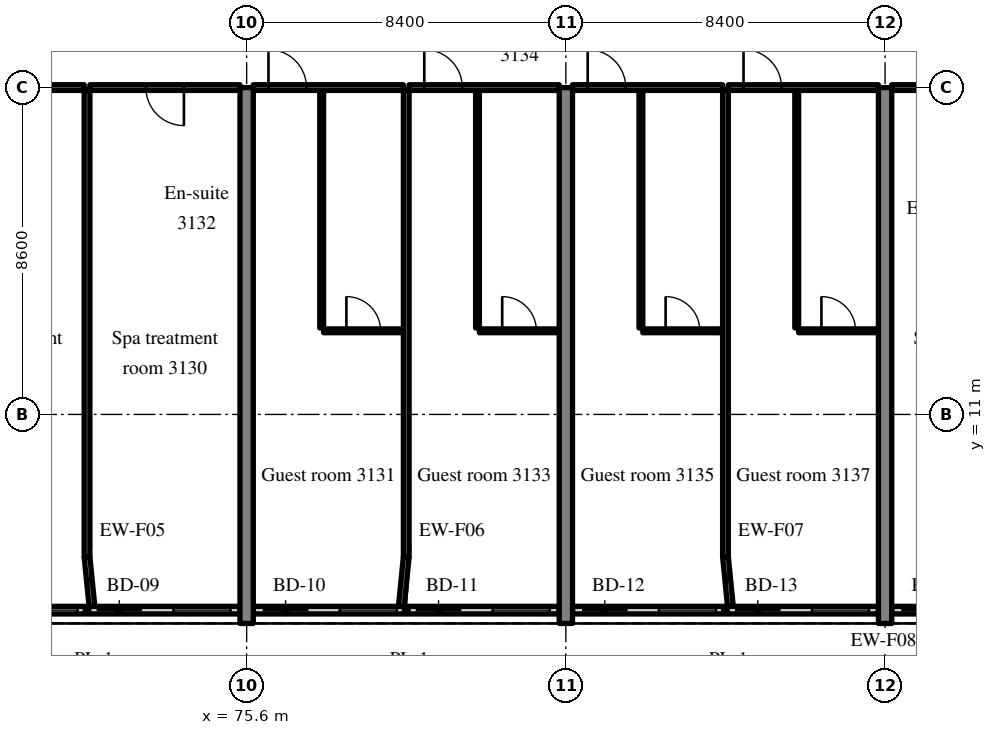
"""IFC4 building model, lengths in metres.
Left out: names, types, materials, properties, quantities, classifications, styles, units other than length and angle.
Written with IfcOpenShell. Run it as: python <this file> out.ifc"""

import sys

from ifc_helpers import new_model, si_unit, direction, frame, frame_2d, origin, place, context, subcontext, project, spatial, rectangle, extrude, source, transform, mapped, element, fill, save


model = new_model("IFC4")
c1 = context("Model", 3, precision=1e-05, world=origin(), true_north=direction((0.0, 1.0)))
c2 = subcontext(c1, "Body", "Model", "MODEL_VIEW")
j1 = project(units=[si_unit("LENGTHUNIT", "METRE"), si_unit("PLANEANGLEUNIT", "RADIAN")], contexts=[c1])
p1 = place(None, origin())
s1 = spatial("IfcSite", under=j1, at=p1, CompositionType="ELEMENT")
p2 = place(p1, origin())
s2 = spatial("IfcBuilding", under=s1, at=p2, CompositionType="ELEMENT")
p3 = place(p2, frame((0.0, 0.0, 129.4)))
s3 = spatial("IfcBuildingStorey", under=s2, at=p3, CompositionType="ELEMENT", Elevation=129.4)
m1 = source(origin(), c2, "Body", "SweptSolid", [
    extrude(rectangle(XDim=14.1, YDim=0.35, at=frame_2d((7.05, 0.0))), origin(), (0.0, 0.0, 1.0), 3.52),
])
for number, where, z_axis, x_axis in (
    (1, (75.6, 5.5, 0.0), (0.0, 0.0, 1.0), (0.0, 1.0, 0.0)),
    (2, (84.0, 5.5, 0.0), (0.0, 0.0, 1.0), (0.0, 1.0, 0.0)),
    (3, (92.4, 5.5, 0.0), (0.0, 0.0, 1.0), (0.0, 1.0, 0.0)),
):
    element("IfcWall", number, at=place(p3, frame(where, z_axis=z_axis, x_axis=x_axis)), inside=s3, PredefinedType="SHEAR", context=c2, shape_type="MappedRepresentation", body=[
        mapped(m1, transform((0.0, 0.0, 0.0), scale=1.0)),
    ])
m2 = source(origin(), c2, "Body", "SweptSolid", [
    extrude(rectangle(XDim=8.05, YDim=0.2, at=frame_2d((4.025, 0.0))), origin(), (0.0, 0.0, 1.0), 2.82),
])
p4 = place(p3, frame((67.375, 5.85, 0.0), z_axis=(0.0, 0.0, 1.0), x_axis=(1.0, 0.0, 0.0)))
e4 = element("IfcWall", 4, at=p4, inside=s3, PredefinedType="SOLIDWALL", context=c2, shape_type="MappedRepresentation", body=[
    mapped(m2, transform((0.0, 0.0, 0.0), scale=1.0)),
])
m3 = source(origin(), c2, "Body", "SweptSolid", [
    extrude(rectangle(XDim=1.2, YDim=2.4, at=frame_2d((0.6, 1.2))), frame((0.0, 0.11, 0.0), z_axis=(0.0, -1.0, 0.0), x_axis=(1.0, 0.0, 0.0)), (0.0, 0.0, 1.0), 0.22),
])
p5 = place(p4, frame((0.25, 0.0, 0.0)))
e5 = element("IfcOpeningElement", 5, at=p5, cuts=e4, PredefinedType="OPENING", context=c2, shape_type="MappedRepresentation", body=[
    mapped(m3, transform((0.0, 0.0, 0.0), scale=1.0)),
])
m4 = source(origin(), c2, "Body", "SweptSolid", [
    extrude(rectangle(XDim=1.5, YDim=1.5, at=frame_2d((0.75, 0.75))), frame((0.0, 0.11, 0.0), z_axis=(0.0, -1.0, 0.0), x_axis=(1.0, 0.0, 0.0)), (0.0, 0.0, 1.0), 0.22),
])
p6 = place(p4, frame((2.275, 0.0, 0.9)))
e6 = element("IfcOpeningElement", 6, at=p6, cuts=e4, PredefinedType="OPENING", context=c2, shape_type="MappedRepresentation", body=[
    mapped(m4, transform((0.0, 0.0, 0.0), scale=1.0)),
])
p7 = place(p4, frame((4.275, 0.0, 0.0)))
e7 = element("IfcOpeningElement", 7, at=p7, cuts=e4, PredefinedType="OPENING", context=c2, shape_type="MappedRepresentation", body=[
    mapped(m3, transform((0.0, 0.0, 0.0), scale=1.0)),
])
p8 = place(p4, frame((6.3, 0.0, 0.9)))
e8 = element("IfcOpeningElement", 8, at=p8, cuts=e4, PredefinedType="OPENING", context=c2, shape_type="MappedRepresentation", body=[
    mapped(m4, transform((0.0, 0.0, 0.0), scale=1.0)),
])
p9 = place(p3, frame((75.775, 5.85, 0.0), z_axis=(0.0, 0.0, 1.0), x_axis=(1.0, 0.0, 0.0)))
e9 = element("IfcWall", 9, at=p9, inside=s3, PredefinedType="SOLIDWALL", context=c2, shape_type="MappedRepresentation", body=[
    mapped(m2, transform((0.0, 0.0, 0.0), scale=1.0)),
])
p10 = place(p9, frame((0.25, 0.0, 0.0)))
e10 = element("IfcOpeningElement", 10, at=p10, cuts=e9, PredefinedType="OPENING", context=c2, shape_type="MappedRepresentation", body=[
    mapped(m3, transform((0.0, 0.0, 0.0), scale=1.0)),
])
p11 = place(p9, frame((2.275, 0.0, 0.9)))
e11 = element("IfcOpeningElement", 11, at=p11, cuts=e9, PredefinedType="OPENING", context=c2, shape_type="MappedRepresentation", body=[
    mapped(m4, transform((0.0, 0.0, 0.0), scale=1.0)),
])
p12 = place(p9, frame((4.275, 0.0, 0.0)))
e12 = element("IfcOpeningElement", 12, at=p12, cuts=e9, PredefinedType="OPENING", context=c2, shape_type="MappedRepresentation", body=[
    mapped(m3, transform((0.0, 0.0, 0.0), scale=1.0)),
])
p13 = place(p9, frame((6.3, 0.0, 0.9)))
e13 = element("IfcOpeningElement", 13, at=p13, cuts=e9, PredefinedType="OPENING", context=c2, shape_type="MappedRepresentation", body=[
    mapped(m4, transform((0.0, 0.0, 0.0), scale=1.0)),
])
p14 = place(p3, frame((84.175, 5.85, 0.0), z_axis=(0.0, 0.0, 1.0), x_axis=(1.0, 0.0, 0.0)))
e14 = element("IfcWall", 14, at=p14, inside=s3, PredefinedType="SOLIDWALL", context=c2, shape_type="MappedRepresentation", body=[
    mapped(m2, transform((0.0, 0.0, 0.0), scale=1.0)),
])
p15 = place(p14, frame((0.25, 0.0, 0.0)))
e15 = element("IfcOpeningElement", 15, at=p15, cuts=e14, PredefinedType="OPENING", context=c2, shape_type="MappedRepresentation", body=[
    mapped(m3, transform((0.0, 0.0, 0.0), scale=1.0)),
])
p16 = place(p14, frame((2.275, 0.0, 0.9)))
e16 = element("IfcOpeningElement", 16, at=p16, cuts=e14, PredefinedType="OPENING", context=c2, shape_type="MappedRepresentation", body=[
    mapped(m4, transform((0.0, 0.0, 0.0), scale=1.0)),
])
p17 = place(p14, frame((4.275, 0.0, 0.0)))
e17 = element("IfcOpeningElement", 17, at=p17, cuts=e14, PredefinedType="OPENING", context=c2, shape_type="MappedRepresentation", body=[
    mapped(m3, transform((0.0, 0.0, 0.0), scale=1.0)),
])
p18 = place(p14, frame((6.3, 0.0, 0.9)))
e18 = element("IfcOpeningElement", 18, at=p18, cuts=e14, PredefinedType="OPENING", context=c2, shape_type="MappedRepresentation", body=[
    mapped(m4, transform((0.0, 0.0, 0.0), scale=1.0)),
])
m5 = source(origin(), c2, "Body", "SweptSolid", [
    extrude(rectangle(XDim=4.08, YDim=0.2, at=frame_2d((2.04, 0.0))), origin(), (0.0, 0.0, 1.0), 2.82),
])
p19 = place(p3, frame((92.575, 5.85, 0.0), z_axis=(0.0, 0.0, 1.0), x_axis=(1.0, 0.0, 0.0)))
e19 = element("IfcWall", 19, at=p19, inside=s3, PredefinedType="SOLIDWALL", context=c2, shape_type="MappedRepresentation", body=[
    mapped(m5, transform((0.0, 0.0, 0.0), scale=1.0)),
])
p20 = place(p19, frame((0.25, 0.0, 0.0)))
e20 = element("IfcOpeningElement", 20, at=p20, cuts=e19, PredefinedType="OPENING", context=c2, shape_type="MappedRepresentation", body=[
    mapped(m3, transform((0.0, 0.0, 0.0), scale=1.0)),
])
p21 = place(p19, frame((2.33, 0.0, 0.9)))
e21 = element("IfcOpeningElement", 21, at=p21, cuts=e19, PredefinedType="OPENING", context=c2, shape_type="MappedRepresentation", body=[
    mapped(m4, transform((0.0, 0.0, 0.0), scale=1.0)),
])
m6 = source(origin(), c2, "Body", "SweptSolid", [
    extrude(rectangle(XDim=3.95, YDim=0.15, at=frame_2d((1.975, 0.0))), origin(), (0.0, 0.0, 1.0), 2.82),
])
p22 = place(p3, frame((67.375, 19.6, 0.0), z_axis=(0.0, 0.0, 1.0), x_axis=(1.0, 0.0, 0.0)))
e22 = element("IfcWall", 22, at=p22, inside=s3, PredefinedType="PARTITIONING", context=c2, shape_type="MappedRepresentation", body=[
    mapped(m6, transform((0.0, 0.0, 0.0), scale=1.0)),
])
m7 = source(origin(), c2, "Body", "SweptSolid", [
    extrude(rectangle(XDim=1.0, YDim=2.1, at=frame_2d((0.5, 1.05))), frame((0.0, 0.085, 0.0), z_axis=(0.0, -1.0, 0.0), x_axis=(1.0, 0.0, 0.0)), (0.0, 0.0, 1.0), 0.17),
])
p23 = place(p22, frame((1.475, 0.0, 0.0)))
e23 = element("IfcOpeningElement", 23, at=p23, cuts=e22, PredefinedType="OPENING", context=c2, shape_type="MappedRepresentation", body=[
    mapped(m7, transform((0.0, 0.0, 0.0), scale=1.0)),
])
p24 = place(p3, frame((71.475, 19.6, 0.0), z_axis=(0.0, 0.0, 1.0), x_axis=(1.0, 0.0, 0.0)))
e24 = element("IfcWall", 24, at=p24, inside=s3, PredefinedType="PARTITIONING", context=c2, shape_type="MappedRepresentation", body=[
    mapped(m6, transform((0.0, 0.0, 0.0), scale=1.0)),
])
p25 = place(p24, frame((1.475, 0.0, 0.0)))
e25 = element("IfcOpeningElement", 25, at=p25, cuts=e24, PredefinedType="OPENING", context=c2, shape_type="MappedRepresentation", body=[
    mapped(m7, transform((0.0, 0.0, 0.0), scale=1.0)),
])
m8 = source(origin(), c2, "Body", "SweptSolid", [
    extrude(rectangle(XDim=12.275, YDim=0.15, at=frame_2d((6.137, 0.0))), origin(), (0.0, 0.0, 1.0), 3.52),
])
p26 = place(p3, frame((71.4, 7.25, 0.0), z_axis=(0.0, 0.0, 1.0), x_axis=(0.0, 1.0, 0.0)))
e26 = element("IfcWall", 26, at=p26, inside=s3, PredefinedType="PARTITIONING", context=c2, shape_type="MappedRepresentation", body=[
    mapped(m8, transform((0.0, 0.0, 0.0), scale=1.0)),
])
m9 = source(origin(), c2, "Body", "SweptSolid", [
    extrude(rectangle(XDim=6.25, YDim=0.1, at=frame_2d((3.125, 0.0))), origin(), (0.0, 0.0, 1.0), 3.52),
])
p27 = place(p3, frame((77.575, 13.275, 0.0), z_axis=(0.0, 0.0, 1.0), x_axis=(0.0, 1.0, 0.0)))
e27 = element("IfcWall", 27, at=p27, inside=s3, PredefinedType="PARTITIONING", context=c2, shape_type="MappedRepresentation", body=[
    mapped(m9, transform((0.0, 0.0, 0.0), scale=1.0)),
])
m10 = source(origin(), c2, "Body", "SweptSolid", [
    extrude(rectangle(XDim=2.1, YDim=0.1, at=frame_2d((1.05, 0.0))), origin(), (0.0, 0.0, 1.0), 3.52),
])
p28 = place(p3, frame((77.625, 13.2, 0.0), z_axis=(0.0, 0.0, 1.0), x_axis=(1.0, 0.0, 0.0)))
e28 = element("IfcWall", 28, at=p28, inside=s3, PredefinedType="PARTITIONING", context=c2, shape_type="MappedRepresentation", body=[
    mapped(m10, transform((0.0, 0.0, 0.0), scale=1.0)),
])
m11 = source(origin(), c2, "Body", "SweptSolid", [
    extrude(rectangle(XDim=0.9, YDim=2.1, at=frame_2d((0.45, 1.05))), frame((0.0, 0.06, 0.0), z_axis=(0.0, -1.0, 0.0), x_axis=(1.0, 0.0, 0.0)), (0.0, 0.0, 1.0), 0.12),
])
p29 = place(p28, frame((0.6, 0.0, 0.0)))
e29 = element("IfcOpeningElement", 29, at=p29, cuts=e28, PredefinedType="OPENING", context=c2, shape_type="MappedRepresentation", body=[
    mapped(m11, transform((0.0, 0.0, 0.0), scale=1.0)),
])
m12 = source(origin(), c2, "Body", "SweptSolid", [
    extrude(rectangle(XDim=3.95, YDim=0.15, at=frame_2d((1.975, 0.0))), origin(), (0.0, 0.0, 1.0), 2.82),
])
p30 = place(p3, frame((75.775, 19.6, 0.0), z_axis=(0.0, 0.0, 1.0), x_axis=(1.0, 0.0, 0.0)))
e30 = element("IfcWall", 30, at=p30, inside=s3, PredefinedType="PARTITIONING", context=c2, shape_type="MappedRepresentation", body=[
    mapped(m12, transform((0.0, 0.0, 0.0), scale=1.0)),
])
p31 = place(p30, frame((0.4, 0.0, 0.0)))
e31 = element("IfcOpeningElement", 31, at=p31, cuts=e30, PredefinedType="OPENING", context=c2, shape_type="MappedRepresentation", body=[
    mapped(m7, transform((0.0, 0.0, 0.0), scale=1.0)),
])
p32 = place(p3, frame((81.675, 13.275, 0.0), z_axis=(0.0, 0.0, 1.0), x_axis=(0.0, 1.0, 0.0)))
e32 = element("IfcWall", 32, at=p32, inside=s3, PredefinedType="PARTITIONING", context=c2, shape_type="MappedRepresentation", body=[
    mapped(m9, transform((0.0, 0.0, 0.0), scale=1.0)),
])
m13 = source(origin(), c2, "Body", "SweptSolid", [
    extrude(rectangle(XDim=2.1, YDim=0.1, at=frame_2d((1.05, 0.0))), origin(), (0.0, 0.0, 1.0), 3.52),
])
p33 = place(p3, frame((81.725, 13.2, 0.0), z_axis=(0.0, 0.0, 1.0), x_axis=(1.0, 0.0, 0.0)))
e33 = element("IfcWall", 33, at=p33, inside=s3, PredefinedType="PARTITIONING", context=c2, shape_type="MappedRepresentation", body=[
    mapped(m13, transform((0.0, 0.0, 0.0), scale=1.0)),
])
p34 = place(p33, frame((0.6, 0.0, 0.0)))
e34 = element("IfcOpeningElement", 34, at=p34, cuts=e33, PredefinedType="OPENING", context=c2, shape_type="MappedRepresentation", body=[
    mapped(m11, transform((0.0, 0.0, 0.0), scale=1.0)),
])
p35 = place(p3, frame((79.875, 19.6, 0.0), z_axis=(0.0, 0.0, 1.0), x_axis=(1.0, 0.0, 0.0)))
e35 = element("IfcWall", 35, at=p35, inside=s3, PredefinedType="PARTITIONING", context=c2, shape_type="MappedRepresentation", body=[
    mapped(m6, transform((0.0, 0.0, 0.0), scale=1.0)),
])
p36 = place(p35, frame((0.4, 0.0, 0.0)))
e36 = element("IfcOpeningElement", 36, at=p36, cuts=e35, PredefinedType="OPENING", context=c2, shape_type="MappedRepresentation", body=[
    mapped(m7, transform((0.0, 0.0, 0.0), scale=1.0)),
])
p37 = place(p3, frame((79.8, 7.25, 0.0), z_axis=(0.0, 0.0, 1.0), x_axis=(0.0, 1.0, 0.0)))
e37 = element("IfcWall", 37, at=p37, inside=s3, PredefinedType="PARTITIONING", context=c2, shape_type="MappedRepresentation", body=[
    mapped(m8, transform((0.0, 0.0, 0.0), scale=1.0)),
])
p38 = place(p3, frame((85.975, 13.275, 0.0), z_axis=(0.0, 0.0, 1.0), x_axis=(0.0, 1.0, 0.0)))
e38 = element("IfcWall", 38, at=p38, inside=s3, PredefinedType="PARTITIONING", context=c2, shape_type="MappedRepresentation", body=[
    mapped(m9, transform((0.0, 0.0, 0.0), scale=1.0)),
])
p39 = place(p3, frame((86.025, 13.2, 0.0), z_axis=(0.0, 0.0, 1.0), x_axis=(1.0, 0.0, 0.0)))
e39 = element("IfcWall", 39, at=p39, inside=s3, PredefinedType="PARTITIONING", context=c2, shape_type="MappedRepresentation", body=[
    mapped(m10, transform((0.0, 0.0, 0.0), scale=1.0)),
])
p40 = place(p39, frame((0.6, 0.0, 0.0)))
e40 = element("IfcOpeningElement", 40, at=p40, cuts=e39, PredefinedType="OPENING", context=c2, shape_type="MappedRepresentation", body=[
    mapped(m11, transform((0.0, 0.0, 0.0), scale=1.0)),
])
p41 = place(p3, frame((84.175, 19.6, 0.0), z_axis=(0.0, 0.0, 1.0), x_axis=(1.0, 0.0, 0.0)))
e41 = element("IfcWall", 41, at=p41, inside=s3, PredefinedType="PARTITIONING", context=c2, shape_type="MappedRepresentation", body=[
    mapped(m6, transform((0.0, 0.0, 0.0), scale=1.0)),
])
p42 = place(p41, frame((0.4, 0.0, 0.0)))
e42 = element("IfcOpeningElement", 42, at=p42, cuts=e41, PredefinedType="OPENING", context=c2, shape_type="MappedRepresentation", body=[
    mapped(m7, transform((0.0, 0.0, 0.0), scale=1.0)),
])
p43 = place(p3, frame((90.075, 13.275, 0.0), z_axis=(0.0, 0.0, 1.0), x_axis=(0.0, 1.0, 0.0)))
e43 = element("IfcWall", 43, at=p43, inside=s3, PredefinedType="PARTITIONING", context=c2, shape_type="MappedRepresentation", body=[
    mapped(m9, transform((0.0, 0.0, 0.0), scale=1.0)),
])
p44 = place(p3, frame((90.125, 13.2, 0.0), z_axis=(0.0, 0.0, 1.0), x_axis=(1.0, 0.0, 0.0)))
e44 = element("IfcWall", 44, at=p44, inside=s3, PredefinedType="PARTITIONING", context=c2, shape_type="MappedRepresentation", body=[
    mapped(m10, transform((0.0, 0.0, 0.0), scale=1.0)),
])
p45 = place(p44, frame((0.6, 0.0, 0.0)))
e45 = element("IfcOpeningElement", 45, at=p45, cuts=e44, PredefinedType="OPENING", context=c2, shape_type="MappedRepresentation", body=[
    mapped(m11, transform((0.0, 0.0, 0.0), scale=1.0)),
])
p46 = place(p3, frame((88.275, 19.6, 0.0), z_axis=(0.0, 0.0, 1.0), x_axis=(1.0, 0.0, 0.0)))
e46 = element("IfcWall", 46, at=p46, inside=s3, PredefinedType="PARTITIONING", context=c2, shape_type="MappedRepresentation", body=[
    mapped(m12, transform((0.0, 0.0, 0.0), scale=1.0)),
])
p47 = place(p46, frame((0.4, 0.0, 0.0)))
e47 = element("IfcOpeningElement", 47, at=p47, cuts=e46, PredefinedType="OPENING", context=c2, shape_type="MappedRepresentation", body=[
    mapped(m7, transform((0.0, 0.0, 0.0), scale=1.0)),
])
p48 = place(p3, frame((88.2, 7.25, 0.0), z_axis=(0.0, 0.0, 1.0), x_axis=(0.0, 1.0, 0.0)))
e48 = element("IfcWall", 48, at=p48, inside=s3, PredefinedType="PARTITIONING", context=c2, shape_type="MappedRepresentation", body=[
    mapped(m8, transform((0.0, 0.0, 0.0), scale=1.0)),
])
p49 = place(p3, frame((92.575, 19.6, 0.0), z_axis=(0.0, 0.0, 1.0), x_axis=(1.0, 0.0, 0.0)))
e49 = element("IfcWall", 49, at=p49, inside=s3, PredefinedType="PARTITIONING", context=c2, shape_type="MappedRepresentation", body=[
    mapped(m6, transform((0.0, 0.0, 0.0), scale=1.0)),
])
p50 = place(p49, frame((1.475, 0.0, 0.0)))
e50 = element("IfcOpeningElement", 50, at=p50, cuts=e49, PredefinedType="OPENING", context=c2, shape_type="MappedRepresentation", body=[
    mapped(m7, transform((0.0, 0.0, 0.0), scale=1.0)),
])
m14 = source(origin(), c2, "Body", "SweptSolid", [
    extrude(rectangle(XDim=1.307, YDim=0.15, at=frame_2d((0.653, 0.0))), origin(), (0.0, 0.0, 1.0), 3.52),
])
for number, where, z_axis, x_axis in (
    (51, (71.53, 5.95, 0.0), (0.0, 0.0, 1.0), (-0.1, 0.995, 0.0)),
    (52, (79.67, 5.95, 0.0), (0.0, 0.0, 1.0), (0.1, 0.995, 0.0)),
    (53, (88.33, 5.95, 0.0), (0.0, 0.0, 1.0), (-0.1, 0.995, 0.0)),
):
    element("IfcWall", number, at=place(p3, frame(where, z_axis=z_axis, x_axis=x_axis)), inside=s3, PredefinedType="PARTITIONING", context=c2, shape_type="MappedRepresentation", body=[
        mapped(m14, transform((0.0, 0.0, 0.0), scale=1.0)),
    ])
m15 = source(origin(), c2, "Body", "SweptSolid", [
    extrude(rectangle(XDim=1.5, YDim=1.5, at=frame_2d((0.75, 0.75))), frame((0.0, 0.03, 0.0), z_axis=(0.0, -1.0, 0.0), x_axis=(1.0, 0.0, 0.0)), (0.0, 0.0, 1.0), 0.06),
])
p51 = place(p6, origin())
e54 = element("IfcWindow", 54, at=p51, inside=s3, PartitioningType="SINGLE_PANEL", PredefinedType="WINDOW", context=c2, shape_type="MappedRepresentation", body=[
    mapped(m15, transform((0.0, 0.0, 0.0), scale=1.0)),
])
fill(e6, e54)
m16 = source(origin(), c2, "Body", "SweptSolid", [
    extrude(rectangle(XDim=1.2, YDim=2.4, at=frame_2d((0.6, 1.2))), frame((0.0, 0.025, 0.0), z_axis=(0.0, -1.0, 0.0), x_axis=(1.0, 0.0, 0.0)), (0.0, 0.0, 1.0), 0.05),
])
p52 = place(p7, origin())
e55 = element("IfcDoor", 55, at=p52, inside=s3, OperationType="SLIDING_TO_LEFT", PredefinedType="DOOR", context=c2, shape_type="MappedRepresentation", body=[
    mapped(m16, transform((0.0, 0.0, 0.0), scale=1.0)),
])
fill(e7, e55)
p53 = place(p8, origin())
e56 = element("IfcWindow", 56, at=p53, inside=s3, PartitioningType="SINGLE_PANEL", PredefinedType="WINDOW", context=c2, shape_type="MappedRepresentation", body=[
    mapped(m15, transform((0.0, 0.0, 0.0), scale=1.0)),
])
fill(e8, e56)
p54 = place(p10, origin())
e57 = element("IfcDoor", 57, at=p54, inside=s3, OperationType="SLIDING_TO_RIGHT", PredefinedType="DOOR", context=c2, shape_type="MappedRepresentation", body=[
    mapped(m16, transform((0.0, 0.0, 0.0), scale=1.0)),
])
fill(e10, e57)
p55 = place(p11, origin())
e58 = element("IfcWindow", 58, at=p55, inside=s3, PartitioningType="SINGLE_PANEL", PredefinedType="WINDOW", context=c2, shape_type="MappedRepresentation", body=[
    mapped(m15, transform((0.0, 0.0, 0.0), scale=1.0)),
])
fill(e11, e58)
p56 = place(p12, origin())
e59 = element("IfcDoor", 59, at=p56, inside=s3, OperationType="SLIDING_TO_LEFT", PredefinedType="DOOR", context=c2, shape_type="MappedRepresentation", body=[
    mapped(m16, transform((0.0, 0.0, 0.0), scale=1.0)),
])
fill(e12, e59)
p57 = place(p13, origin())
e60 = element("IfcWindow", 60, at=p57, inside=s3, PartitioningType="SINGLE_PANEL", PredefinedType="WINDOW", context=c2, shape_type="MappedRepresentation", body=[
    mapped(m15, transform((0.0, 0.0, 0.0), scale=1.0)),
])
fill(e13, e60)
p58 = place(p15, origin())
e61 = element("IfcDoor", 61, at=p58, inside=s3, OperationType="SLIDING_TO_RIGHT", PredefinedType="DOOR", context=c2, shape_type="MappedRepresentation", body=[
    mapped(m16, transform((0.0, 0.0, 0.0), scale=1.0)),
])
fill(e15, e61)
p59 = place(p16, origin())
e62 = element("IfcWindow", 62, at=p59, inside=s3, PartitioningType="SINGLE_PANEL", PredefinedType="WINDOW", context=c2, shape_type="MappedRepresentation", body=[
    mapped(m15, transform((0.0, 0.0, 0.0), scale=1.0)),
])
fill(e16, e62)
p60 = place(p17, origin())
e63 = element("IfcDoor", 63, at=p60, inside=s3, OperationType="SLIDING_TO_LEFT", PredefinedType="DOOR", context=c2, shape_type="MappedRepresentation", body=[
    mapped(m16, transform((0.0, 0.0, 0.0), scale=1.0)),
])
fill(e17, e63)
p61 = place(p18, origin())
e64 = element("IfcWindow", 64, at=p61, inside=s3, PartitioningType="SINGLE_PANEL", PredefinedType="WINDOW", context=c2, shape_type="MappedRepresentation", body=[
    mapped(m15, transform((0.0, 0.0, 0.0), scale=1.0)),
])
fill(e18, e64)
p62 = place(p20, origin())
e65 = element("IfcDoor", 65, at=p62, inside=s3, OperationType="SLIDING_TO_RIGHT", PredefinedType="DOOR", context=c2, shape_type="MappedRepresentation", body=[
    mapped(m16, transform((0.0, 0.0, 0.0), scale=1.0)),
])
fill(e20, e65)
m17 = source(origin(), c2, "Body", "SweptSolid", [
    extrude(rectangle(XDim=1.0, YDim=2.1, at=frame_2d((0.5, 1.05))), frame((0.0, 0.025, 0.0), z_axis=(0.0, -1.0, 0.0), x_axis=(1.0, 0.0, 0.0)), (0.0, 0.0, 1.0), 0.05),
])
p63 = place(p25, origin())
e66 = element("IfcDoor", 66, at=p63, inside=s3, OperationType="SINGLE_SWING_RIGHT", PredefinedType="DOOR", context=c2, shape_type="MappedRepresentation", body=[
    mapped(m17, transform((0.0, 0.0, 0.0), scale=1.0)),
])
fill(e25, e66)
m18 = source(origin(), c2, "Body", "SweptSolid", [
    extrude(rectangle(XDim=0.9, YDim=2.1, at=frame_2d((0.45, 1.05))), frame((0.0, 0.025, 0.0), z_axis=(0.0, -1.0, 0.0), x_axis=(1.0, 0.0, 0.0)), (0.0, 0.0, 1.0), 0.05),
])
p64 = place(p29, origin())
e67 = element("IfcDoor", 67, at=p64, inside=s3, OperationType="SINGLE_SWING_LEFT", PredefinedType="DOOR", context=c2, shape_type="MappedRepresentation", body=[
    mapped(m18, transform((0.0, 0.0, 0.0), scale=1.0)),
])
fill(e29, e67)
p65 = place(p31, origin())
e68 = element("IfcDoor", 68, at=p65, inside=s3, OperationType="SINGLE_SWING_LEFT", PredefinedType="DOOR", context=c2, shape_type="MappedRepresentation", body=[
    mapped(m17, transform((0.0, 0.0, 0.0), scale=1.0)),
])
fill(e31, e68)
p66 = place(p34, origin())
e69 = element("IfcDoor", 69, at=p66, inside=s3, OperationType="SINGLE_SWING_LEFT", PredefinedType="DOOR", context=c2, shape_type="MappedRepresentation", body=[
    mapped(m18, transform((0.0, 0.0, 0.0), scale=1.0)),
])
fill(e34, e69)
p67 = place(p36, origin())
e70 = element("IfcDoor", 70, at=p67, inside=s3, OperationType="SINGLE_SWING_LEFT", PredefinedType="DOOR", context=c2, shape_type="MappedRepresentation", body=[
    mapped(m17, transform((0.0, 0.0, 0.0), scale=1.0)),
])
fill(e36, e70)
p68 = place(p40, origin())
e71 = element("IfcDoor", 71, at=p68, inside=s3, OperationType="SINGLE_SWING_LEFT", PredefinedType="DOOR", context=c2, shape_type="MappedRepresentation", body=[
    mapped(m18, transform((0.0, 0.0, 0.0), scale=1.0)),
])
fill(e40, e71)
p69 = place(p42, origin())
e72 = element("IfcDoor", 72, at=p69, inside=s3, OperationType="SINGLE_SWING_LEFT", PredefinedType="DOOR", context=c2, shape_type="MappedRepresentation", body=[
    mapped(m17, transform((0.0, 0.0, 0.0), scale=1.0)),
])
fill(e42, e72)
p70 = place(p45, origin())
e73 = element("IfcDoor", 73, at=p70, inside=s3, OperationType="SINGLE_SWING_LEFT", PredefinedType="DOOR", context=c2, shape_type="MappedRepresentation", body=[
    mapped(m18, transform((0.0, 0.0, 0.0), scale=1.0)),
])
fill(e45, e73)
p71 = place(p47, origin())
e74 = element("IfcDoor", 74, at=p71, inside=s3, OperationType="SINGLE_SWING_LEFT", PredefinedType="DOOR", context=c2, shape_type="MappedRepresentation", body=[
    mapped(m17, transform((0.0, 0.0, 0.0), scale=1.0)),
])
fill(e47, e74)
save(model, sys.argv[1])
